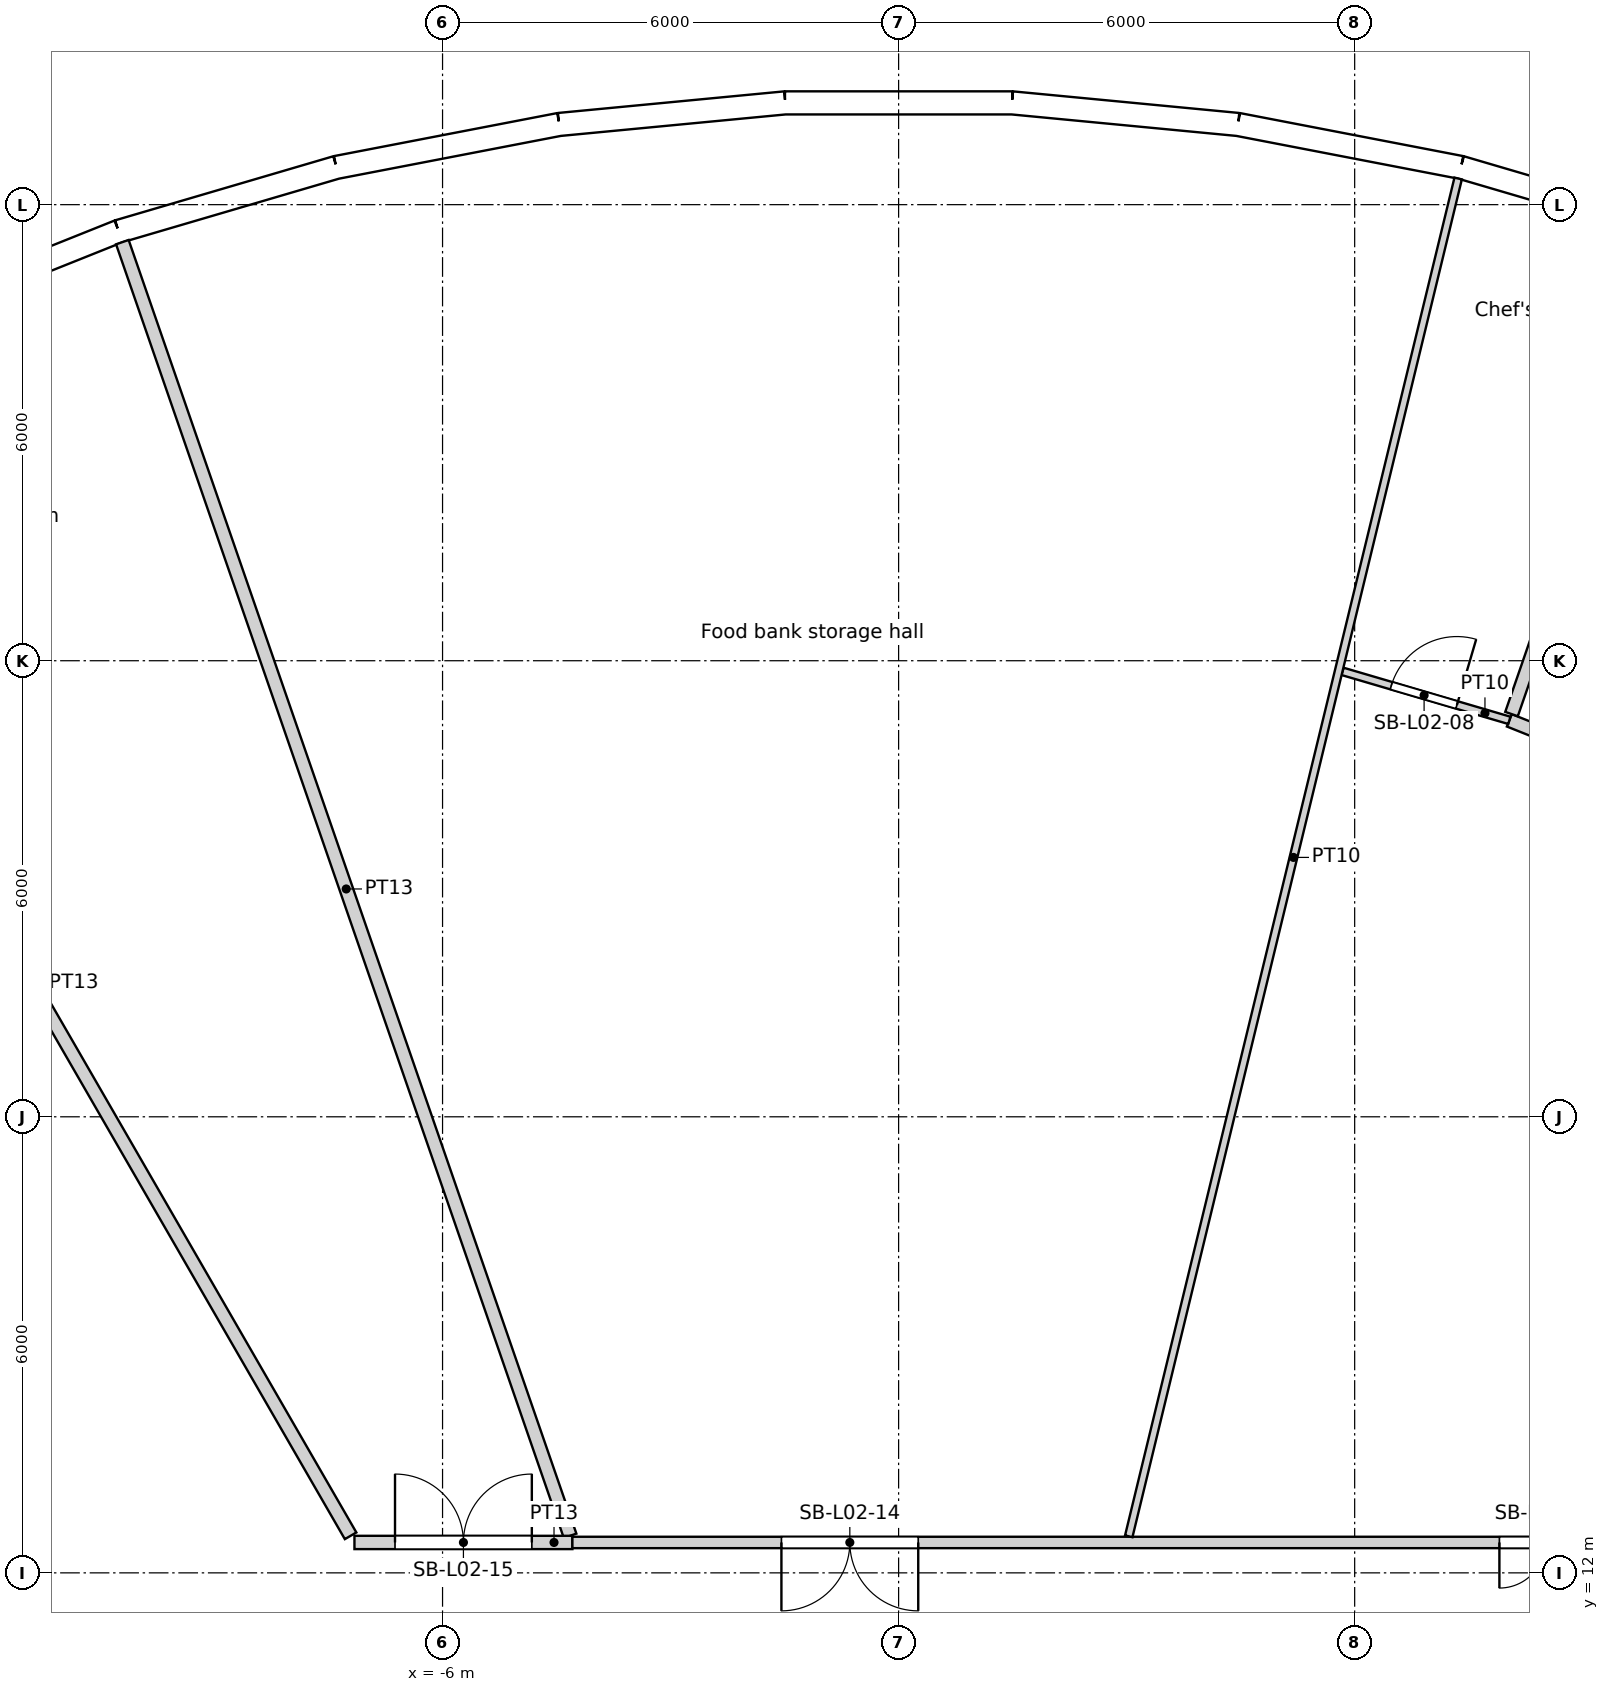
"""IFC4 building model, lengths in metres.
Left out: names, types, materials, properties, quantities, classifications, styles, units other than length and angle.
Written with IfcOpenShell. Run it as: python <this file> out.ifc"""

import sys

from ifc_helpers import new_model, si_unit, direction, frame, frame_2d, origin, origin_2d, place, context, subcontext, project, spatial, rectangle, circle, extrude, element, fill, save


model = new_model("IFC4")
c1 = context("Model", 3, precision=1e-05, world=origin(), true_north=direction((0.0, 1.0)))
c2 = subcontext(c1, "Body", "Model", "MODEL_VIEW")
j1 = project(units=[si_unit("LENGTHUNIT", "METRE"), si_unit("PLANEANGLEUNIT", "RADIAN")], contexts=[c1])
p1 = place(None, origin())
s1 = spatial("IfcSite", under=j1, at=p1, CompositionType="ELEMENT")
p2 = place(p1, origin())
s2 = spatial("IfcBuilding", under=s1, at=p2, CompositionType="ELEMENT")
p3 = place(p2, frame((0.0, 0.0, 13.8)))
s3 = spatial("IfcBuildingStorey", under=s2, at=p3, CompositionType="ELEMENT", Elevation=13.8)
for number, where, z_axis, x_axis in (
    (1, (7.137, 29.421, 0.0), (0.0, 0.0, 1.0), (1.0, 0.0, 0.0)),
    (2, (1.44, 30.24, 0.0), (0.0, 0.0, 1.0), (1.0, 0.0, 0.0)),
    (3, (-4.309, 29.966, 0.0), (0.0, 0.0, 1.0), (1.0, 0.0, 0.0)),
    (4, (-9.902, 28.61, 0.0), (0.0, 0.0, 1.0), (1.0, 0.0, 0.0)),
):
    element("IfcColumn", number, at=place(p3, frame(where, z_axis=z_axis, x_axis=x_axis)), inside=s3, PredefinedType="COLUMN", context=c2, shape_type="SweptSolid", body=[
        extrude(circle(Radius=0.7, at=origin_2d()), origin(), (0.0, 0.0, 1.0), 4.8),
    ])
for number, where, z_axis, x_axis in (
    (5, (4.263, 24.175, 0.0), (0.0, 0.0, 1.0), (1.0, 0.0, 0.0)),
    (6, (-1.427, 24.506, 0.0), (0.0, 0.0, 1.0), (1.0, 0.0, 0.0)),
    (7, (-7.04, 23.516, 0.0), (0.0, 0.0, 1.0), (1.0, 0.0, 0.0)),
):
    element("IfcColumn", number, at=place(p3, frame(where, z_axis=z_axis, x_axis=x_axis)), inside=s3, PredefinedType="COLUMN", context=c2, shape_type="SweptSolid", body=[
        extrude(circle(Radius=0.75, at=origin_2d()), origin(), (0.0, 0.0, 1.0), 4.8),
    ])
for number, where, z_axis, x_axis in (
    (8, (6.876, 17.521, 0.0), (0.0, 0.0, 1.0), (1.0, 0.0, 0.0)),
    (9, (1.406, 18.77, 0.0), (0.0, 0.0, 1.0), (1.0, 0.0, 0.0)),
    (10, (-4.188, 18.35, 0.0), (0.0, 0.0, 1.0), (1.0, 0.0, 0.0)),
    (11, (-9.411, 16.301, 0.0), (0.0, 0.0, 1.0), (1.0, 0.0, 0.0)),
):
    element("IfcColumn", number, at=place(p3, frame(where, z_axis=z_axis, x_axis=x_axis)), inside=s3, PredefinedType="COLUMN", context=c2, shape_type="SweptSolid", body=[
        extrude(circle(Radius=0.8, at=origin_2d()), origin(), (0.0, 0.0, 1.0), 4.8),
    ])
p4 = place(p3, frame((10.261, 29.649, 0.0), z_axis=(0.0, 0.0, 1.0), x_axis=(-0.959502108153, 0.281701445593, 0.0)))
e12 = element("IfcWall", 12, at=p4, inside=s3, PredefinedType="SOLIDWALL", context=c2, shape_type="SweptSolid", body=[
    extrude(rectangle(XDim=2.986, YDim=0.3, at=frame_2d((1.493, 0.0))), origin(), (0.0, 0.0, 1.0), 4.35),
])
p5 = place(p4, frame((1.493, 0.0, 2.0)))
e13 = element("IfcOpeningElement", 13, at=p5, cuts=e12, PredefinedType="OPENING", context=c2, shape_type="SweptSolid", body=[
    extrude(circle(Radius=1.2, at=origin_2d()), frame((0.0, 0.16, 0.0), z_axis=(0.0, -1.0, 0.0), x_axis=(1.0, 0.0, 0.0)), (0.0, 0.0, 1.0), 0.32),
])
p6 = place(p3, frame((7.397, 30.49, 0.0), z_axis=(0.0, 0.0, 1.0), x_axis=(-0.981918853666, 0.189302310646, 0.0)))
e14 = element("IfcWall", 14, at=p6, inside=s3, PredefinedType="SOLIDWALL", context=c2, shape_type="SweptSolid", body=[
    extrude(rectangle(XDim=2.986, YDim=0.3, at=frame_2d((1.493, 0.0))), origin(), (0.0, 0.0, 1.0), 4.35),
])
p7 = place(p6, frame((1.493, 0.0, 2.0)))
e15 = element("IfcOpeningElement", 15, at=p7, cuts=e14, PredefinedType="OPENING", context=c2, shape_type="SweptSolid", body=[
    extrude(circle(Radius=1.2, at=origin_2d()), frame((0.0, 0.16, 0.0), z_axis=(0.0, -1.0, 0.0), x_axis=(1.0, 0.0, 0.0)), (0.0, 0.0, 1.0), 0.32),
])
p8 = place(p3, frame((4.465, 31.055, 0.0), z_axis=(0.0, 0.0, 1.0), x_axis=(-0.99547560533, 0.095017467833, 0.0)))
e16 = element("IfcWall", 16, at=p8, inside=s3, PredefinedType="SOLIDWALL", context=c2, shape_type="SweptSolid", body=[
    extrude(rectangle(XDim=2.986, YDim=0.3, at=frame_2d((1.493, 0.0))), origin(), (0.0, 0.0, 1.0), 4.35),
])
p9 = place(p8, frame((1.493, 0.0, 2.0)))
e17 = element("IfcOpeningElement", 17, at=p9, cuts=e16, PredefinedType="OPENING", context=c2, shape_type="SweptSolid", body=[
    extrude(circle(Radius=1.2, at=origin_2d()), frame((0.0, 0.16, 0.0), z_axis=(0.0, -1.0, 0.0), x_axis=(1.0, 0.0, 0.0)), (0.0, 0.0, 1.0), 0.32),
])
p10 = place(p3, frame((1.493, 31.339, 0.0), z_axis=(0.0, 0.0, 1.0), x_axis=(-1.0, 0.0, 0.0)))
e18 = element("IfcWall", 18, at=p10, inside=s3, PredefinedType="SOLIDWALL", context=c2, shape_type="SweptSolid", body=[
    extrude(rectangle(XDim=2.986, YDim=0.3, at=frame_2d((1.493, 0.0))), origin(), (0.0, 0.0, 1.0), 4.35),
])
p11 = place(p10, frame((1.493, 0.0, 2.0)))
e19 = element("IfcOpeningElement", 19, at=p11, cuts=e18, PredefinedType="OPENING", context=c2, shape_type="SweptSolid", body=[
    extrude(circle(Radius=1.2, at=origin_2d()), frame((0.0, 0.16, 0.0), z_axis=(0.0, -1.0, 0.0), x_axis=(1.0, 0.0, 0.0)), (0.0, 0.0, 1.0), 0.32),
])
p12 = place(p3, frame((-1.493, 31.339, 0.0), z_axis=(0.0, 0.0, 1.0), x_axis=(-0.99547560533, -0.095017467833, 0.0)))
e20 = element("IfcWall", 20, at=p12, inside=s3, PredefinedType="SOLIDWALL", context=c2, shape_type="SweptSolid", body=[
    extrude(rectangle(XDim=2.986, YDim=0.3, at=frame_2d((1.493, 0.0))), origin(), (0.0, 0.0, 1.0), 4.35),
])
p13 = place(p12, frame((1.493, 0.0, 2.0)))
e21 = element("IfcOpeningElement", 21, at=p13, cuts=e20, PredefinedType="OPENING", context=c2, shape_type="SweptSolid", body=[
    extrude(circle(Radius=1.2, at=origin_2d()), frame((0.0, 0.16, 0.0), z_axis=(0.0, -1.0, 0.0), x_axis=(1.0, 0.0, 0.0)), (0.0, 0.0, 1.0), 0.32),
])
p14 = place(p3, frame((-4.465, 31.055, 0.0), z_axis=(0.0, 0.0, 1.0), x_axis=(-0.981918853666, -0.189302310646, 0.0)))
e22 = element("IfcWall", 22, at=p14, inside=s3, PredefinedType="SOLIDWALL", context=c2, shape_type="SweptSolid", body=[
    extrude(rectangle(XDim=2.986, YDim=0.3, at=frame_2d((1.493, 0.0))), origin(), (0.0, 0.0, 1.0), 4.35),
])
p15 = place(p14, frame((1.493, 0.0, 2.0)))
e23 = element("IfcOpeningElement", 23, at=p15, cuts=e22, PredefinedType="OPENING", context=c2, shape_type="SweptSolid", body=[
    extrude(circle(Radius=1.2, at=origin_2d()), frame((0.0, 0.16, 0.0), z_axis=(0.0, -1.0, 0.0), x_axis=(1.0, 0.0, 0.0)), (0.0, 0.0, 1.0), 0.32),
])
p16 = place(p3, frame((-7.397, 30.49, 0.0), z_axis=(0.0, 0.0, 1.0), x_axis=(-0.959502108153, -0.281701445593, 0.0)))
e24 = element("IfcWall", 24, at=p16, inside=s3, PredefinedType="SOLIDWALL", context=c2, shape_type="SweptSolid", body=[
    extrude(rectangle(XDim=2.986, YDim=0.3, at=frame_2d((1.493, 0.0))), origin(), (0.0, 0.0, 1.0), 4.35),
])
p17 = place(p16, frame((1.493, 0.0, 2.0)))
e25 = element("IfcOpeningElement", 25, at=p17, cuts=e24, PredefinedType="OPENING", context=c2, shape_type="SweptSolid", body=[
    extrude(circle(Radius=1.2, at=origin_2d()), frame((0.0, 0.16, 0.0), z_axis=(0.0, -1.0, 0.0), x_axis=(1.0, 0.0, 0.0)), (0.0, 0.0, 1.0), 0.32),
])
p18 = place(p3, frame((-10.261, 29.649, 0.0), z_axis=(0.0, 0.0, 1.0), x_axis=(-0.928380795373, -0.371630325434, 0.0)))
e26 = element("IfcWall", 26, at=p18, inside=s3, PredefinedType="SOLIDWALL", context=c2, shape_type="SweptSolid", body=[
    extrude(rectangle(XDim=2.986, YDim=0.3, at=frame_2d((1.493, 0.0))), origin(), (0.0, 0.0, 1.0), 4.35),
])
p19 = place(p18, frame((1.493, 0.0, 2.0)))
e27 = element("IfcOpeningElement", 27, at=p19, cuts=e26, PredefinedType="OPENING", context=c2, shape_type="SweptSolid", body=[
    extrude(circle(Radius=1.2, at=origin_2d()), frame((0.0, 0.16, 0.0), z_axis=(0.0, -1.0, 0.0), x_axis=(1.0, 0.0, 0.0)), (0.0, 0.0, 1.0), 0.32),
])
p20 = place(p3, frame((-15.612, 27.041, 0.0), z_axis=(0.0, 0.0, 1.0), x_axis=(0.49999534853, -0.866028089296, 0.0)))
e28 = element("IfcWall", 28, at=p20, inside=s3, PredefinedType="PARTITIONING", context=c2, shape_type="SweptSolid", body=[
    extrude(rectangle(XDim=16.805, YDim=0.175, at=frame_2d((8.402, 0.0))), origin(), (0.0, 0.0, 1.0), 3.75),
])
p21 = place(p3, frame((-10.212, 29.507, 0.0), z_axis=(0.0, 0.0, 1.0), x_axis=(0.327061210949, -0.945003155705, 0.0)))
e29 = element("IfcWall", 29, at=p21, inside=s3, PredefinedType="PARTITIONING", context=c2, shape_type="SweptSolid", body=[
    extrude(rectangle(XDim=18.01, YDim=0.175, at=frame_2d((9.005, 0.0))), origin(), (0.0, 0.0, 1.0), 3.75),
])
p22 = place(p3, frame((-7.159, 12.4, 0.0), z_axis=(0.0, 0.0, 1.0), x_axis=(1.0, 0.0, 0.0)))
e30 = element("IfcWall", 30, at=p22, inside=s3, PredefinedType="PARTITIONING", context=c2, shape_type="SweptSolid", body=[
    extrude(rectangle(XDim=2.867, YDim=0.175, at=frame_2d((1.434, 0.0))), origin(), (0.0, 0.0, 1.0), 3.75),
])
p23 = place(p22, frame((0.534, 0.0, 0.0)))
e31 = element("IfcOpeningElement", 31, at=p23, cuts=e30, PredefinedType="OPENING", context=c2, shape_type="SweptSolid", body=[
    extrude(rectangle(XDim=1.8, YDim=2.4, at=frame_2d((0.9, 1.2))), frame((0.0, 0.087, 0.0), z_axis=(0.0, -1.0, 0.0), x_axis=(1.0, 0.0, 0.0)), (0.0, 0.0, 1.0), 0.175),
])
p24 = place(p3, frame((7.361, 30.344, 0.0), z_axis=(0.0, 0.0, 1.0), x_axis=(-0.235757403407, -0.971811940006, 0.0)))
e32 = element("IfcWall", 32, at=p24, inside=s3, PredefinedType="PARTITIONING", context=c2, shape_type="SweptSolid", body=[
    extrude(rectangle(XDim=18.381, YDim=0.1, at=frame_2d((9.19, 0.0))), origin(), (0.0, 0.0, 1.0), 3.75),
])
p25 = place(p3, frame((5.841, 23.86, 0.0), z_axis=(0.0, 0.0, 1.0), x_axis=(0.959479339295, -0.281778986913, 0.0)))
e33 = element("IfcWall", 33, at=p25, inside=s3, PredefinedType="PARTITIONING", context=c2, shape_type="SweptSolid", body=[
    extrude(rectangle(XDim=2.286, YDim=0.1, at=frame_2d((1.143, 0.0))), origin(), (0.0, 0.0, 1.0), 3.75),
])
p26 = place(p25, frame((0.668, 0.0, 0.0)))
e34 = element("IfcOpeningElement", 34, at=p26, cuts=e33, PredefinedType="OPENING", context=c2, shape_type="SweptSolid", body=[
    extrude(rectangle(XDim=0.9, YDim=2.1, at=frame_2d((0.45, 1.05))), frame((0.0, 0.05, 0.0), z_axis=(0.0, -1.0, 0.0), x_axis=(1.0, 0.0, 0.0)), (0.0, 0.0, 1.0), 0.1),
])
p27 = place(p3, frame((10.205, 22.347, 0.0), z_axis=(0.0, 0.0, 1.0), x_axis=(-0.92836862221, 0.371660734133, 0.0)))
e35 = element("IfcWall", 35, at=p27, inside=s3, PredefinedType="PARTITIONING", context=c2, shape_type="SweptSolid", body=[
    extrude(rectangle(XDim=2.338, YDim=0.175, at=frame_2d((1.169, 0.0))), origin(), (0.0, 0.0, 1.0), 3.75),
])
p28 = place(p3, frame((10.212, 29.507, 0.0), z_axis=(0.0, 0.0, 1.0), x_axis=(-0.327042919546, -0.945009486077, 0.0)))
e36 = element("IfcWall", 36, at=p28, inside=s3, PredefinedType="PARTITIONING", context=c2, shape_type="SweptSolid", body=[
    extrude(rectangle(XDim=6.57, YDim=0.175, at=frame_2d((3.285, 0.0))), origin(), (0.0, 0.0, 1.0), 3.75),
])
p29 = place(p3, frame((-4.292, 12.4, 0.0), z_axis=(0.0, 0.0, 1.0), x_axis=(1.0, 0.0, 0.0)))
e37 = element("IfcWall", 37, at=p29, inside=s3, PredefinedType="PARTITIONING", context=c2, shape_type="SweptSolid", body=[
    extrude(rectangle(XDim=22.118, YDim=0.15, at=frame_2d((11.059, 0.0))), origin(), (0.0, 0.0, 1.0), 3.75),
])
p30 = place(p29, frame((12.196, 0.0, 0.0)))
e38 = element("IfcOpeningElement", 38, at=p30, cuts=e37, PredefinedType="OPENING", context=c2, shape_type="SweptSolid", body=[
    extrude(rectangle(XDim=1.2, YDim=2.4, at=frame_2d((0.6, 1.2))), frame((0.0, 0.075, 0.0), z_axis=(0.0, -1.0, 0.0), x_axis=(1.0, 0.0, 0.0)), (0.0, 0.0, 1.0), 0.15),
])
p31 = place(p29, frame((2.75, 0.0, 0.0)))
e39 = element("IfcOpeningElement", 39, at=p31, cuts=e37, PredefinedType="OPENING", context=c2, shape_type="SweptSolid", body=[
    extrude(rectangle(XDim=1.8, YDim=2.4, at=frame_2d((0.9, 1.2))), frame((0.0, 0.075, 0.0), z_axis=(0.0, -1.0, 0.0), x_axis=(1.0, 0.0, 0.0)), (0.0, 0.0, 1.0), 0.15),
])
p32 = place(p5, origin())
e40 = element("IfcWindow", 40, at=p32, inside=s3, PartitioningType="SINGLE_PANEL", PredefinedType="WINDOW", context=c2, shape_type="SweptSolid", body=[
    extrude(circle(Radius=1.2, at=origin_2d()), frame((0.0, 0.12, 0.0), z_axis=(0.0, -1.0, 0.0), x_axis=(1.0, 0.0, 0.0)), (0.0, 0.0, 1.0), 0.1),
])
fill(e13, e40)
p33 = place(p7, origin())
e41 = element("IfcWindow", 41, at=p33, inside=s3, PartitioningType="SINGLE_PANEL", PredefinedType="WINDOW", context=c2, shape_type="SweptSolid", body=[
    extrude(circle(Radius=1.2, at=origin_2d()), frame((0.0, 0.12, 0.0), z_axis=(0.0, -1.0, 0.0), x_axis=(1.0, 0.0, 0.0)), (0.0, 0.0, 1.0), 0.1),
])
fill(e15, e41)
p34 = place(p9, origin())
e42 = element("IfcWindow", 42, at=p34, inside=s3, PartitioningType="SINGLE_PANEL", PredefinedType="WINDOW", context=c2, shape_type="SweptSolid", body=[
    extrude(circle(Radius=1.2, at=origin_2d()), frame((0.0, 0.12, 0.0), z_axis=(0.0, -1.0, 0.0), x_axis=(1.0, 0.0, 0.0)), (0.0, 0.0, 1.0), 0.1),
])
fill(e17, e42)
p35 = place(p11, origin())
e43 = element("IfcWindow", 43, at=p35, inside=s3, PartitioningType="SINGLE_PANEL", PredefinedType="WINDOW", context=c2, shape_type="SweptSolid", body=[
    extrude(circle(Radius=1.2, at=origin_2d()), frame((0.0, 0.12, 0.0), z_axis=(0.0, -1.0, 0.0), x_axis=(1.0, 0.0, 0.0)), (0.0, 0.0, 1.0), 0.1),
])
fill(e19, e43)
p36 = place(p13, origin())
e44 = element("IfcWindow", 44, at=p36, inside=s3, PartitioningType="SINGLE_PANEL", PredefinedType="WINDOW", context=c2, shape_type="SweptSolid", body=[
    extrude(circle(Radius=1.2, at=origin_2d()), frame((0.0, 0.12, 0.0), z_axis=(0.0, -1.0, 0.0), x_axis=(1.0, 0.0, 0.0)), (0.0, 0.0, 1.0), 0.1),
])
fill(e21, e44)
p37 = place(p15, origin())
e45 = element("IfcWindow", 45, at=p37, inside=s3, PartitioningType="SINGLE_PANEL", PredefinedType="WINDOW", context=c2, shape_type="SweptSolid", body=[
    extrude(circle(Radius=1.2, at=origin_2d()), frame((0.0, 0.12, 0.0), z_axis=(0.0, -1.0, 0.0), x_axis=(1.0, 0.0, 0.0)), (0.0, 0.0, 1.0), 0.1),
])
fill(e23, e45)
p38 = place(p17, origin())
e46 = element("IfcWindow", 46, at=p38, inside=s3, PartitioningType="SINGLE_PANEL", PredefinedType="WINDOW", context=c2, shape_type="SweptSolid", body=[
    extrude(circle(Radius=1.2, at=origin_2d()), frame((0.0, 0.12, 0.0), z_axis=(0.0, -1.0, 0.0), x_axis=(1.0, 0.0, 0.0)), (0.0, 0.0, 1.0), 0.1),
])
fill(e25, e46)
p39 = place(p19, origin())
e47 = element("IfcWindow", 47, at=p39, inside=s3, PartitioningType="SINGLE_PANEL", PredefinedType="WINDOW", context=c2, shape_type="SweptSolid", body=[
    extrude(circle(Radius=1.2, at=origin_2d()), frame((0.0, 0.12, 0.0), z_axis=(0.0, -1.0, 0.0), x_axis=(1.0, 0.0, 0.0)), (0.0, 0.0, 1.0), 0.1),
])
fill(e27, e47)
p40 = place(p30, origin())
e48 = element("IfcDoor", 48, at=p40, inside=s3, OperationType="DOUBLE_DOOR_SINGLE_SWING", PredefinedType="DOOR", context=c2, shape_type="SweptSolid", body=[
    extrude(rectangle(XDim=1.2, YDim=2.4, at=frame_2d((0.6, 1.2))), frame((0.0, 0.025, 0.0), z_axis=(0.0, -1.0, 0.0), x_axis=(1.0, 0.0, 0.0)), (0.0, 0.0, 1.0), 0.05),
])
fill(e38, e48)
p41 = place(p26, origin())
e49 = element("IfcDoor", 49, at=p41, inside=s3, OperationType="SINGLE_SWING_RIGHT", PredefinedType="DOOR", context=c2, shape_type="SweptSolid", body=[
    extrude(rectangle(XDim=0.9, YDim=2.1, at=frame_2d((0.45, 1.05))), frame((0.0, 0.025, 0.0), z_axis=(0.0, -1.0, 0.0), x_axis=(1.0, 0.0, 0.0)), (0.0, 0.0, 1.0), 0.05),
])
fill(e34, e49)
p42 = place(p31, origin())
e50 = element("IfcDoor", 50, at=p42, inside=s3, OperationType="DOUBLE_DOOR_SINGLE_SWING", PredefinedType="DOOR", context=c2, shape_type="SweptSolid", body=[
    extrude(rectangle(XDim=1.8, YDim=2.4, at=frame_2d((0.9, 1.2))), frame((0.0, 0.025, 0.0), z_axis=(0.0, -1.0, 0.0), x_axis=(1.0, 0.0, 0.0)), (0.0, 0.0, 1.0), 0.05),
])
fill(e39, e50)
p43 = place(p23, origin())
e51 = element("IfcDoor", 51, at=p43, inside=s3, OperationType="DOUBLE_DOOR_SINGLE_SWING", PredefinedType="DOOR", context=c2, shape_type="SweptSolid", body=[
    extrude(rectangle(XDim=1.8, YDim=2.4, at=frame_2d((0.9, 1.2))), frame((0.0, 0.025, 0.0), z_axis=(0.0, -1.0, 0.0), x_axis=(1.0, 0.0, 0.0)), (0.0, 0.0, 1.0), 0.05),
])
fill(e31, e51)
save(model, sys.argv[1])
